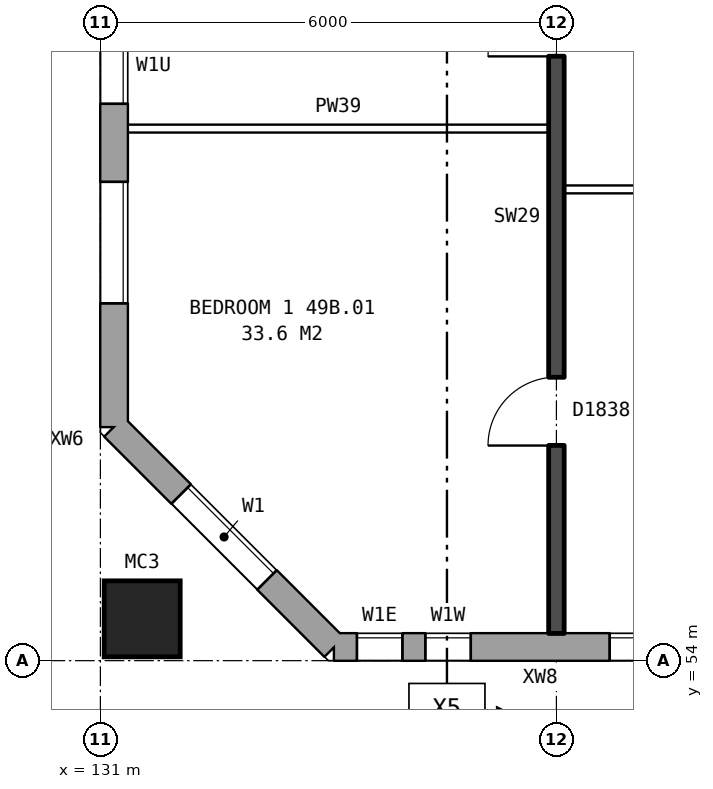
"""IFC4 building model, lengths in metres.
Left out: names, types, materials, properties, quantities, classifications, styles, units other than length and angle.
Written with IfcOpenShell. Run it as: python <this file> out.ifc"""

import sys

from ifc_helpers import new_model, si_unit, direction, frame, frame_2d, origin, origin_2d, place, context, subcontext, project, spatial, rectangle, hollow_rectangle, extrude, element, fill, save


model = new_model("IFC4")
c1 = context("Model", 3, precision=1e-05, world=origin(), true_north=direction((0.0, 1.0)))
c2 = subcontext(c1, "Body", "Model", "MODEL_VIEW")
j1 = project(units=[si_unit("LENGTHUNIT", "METRE"), si_unit("PLANEANGLEUNIT", "RADIAN")], contexts=[c1])
p1 = place(None, origin())
s1 = spatial("IfcSite", under=j1, at=p1, CompositionType="ELEMENT")
p2 = place(p1, origin())
s2 = spatial("IfcBuilding", under=s1, at=p2, CompositionType="ELEMENT")
p3 = place(p2, frame((0.0, 0.0, 175.8)))
s3 = spatial("IfcBuildingStorey", under=s2, at=p3, CompositionType="ELEMENT", Elevation=175.8)
p4 = place(p3, frame((131.55, 54.55, 0.0), z_axis=(0.0, 0.0, 1.0), x_axis=(1.0, 0.0, 0.0)))
e1 = element("IfcColumn", 1, at=p4, inside=s3, PredefinedType="COLUMN", context=c2, shape_type="SweptSolid", body=[
    extrude(hollow_rectangle(XDim=1.0, YDim=1.0, WallThickness=0.055, at=origin_2d()), origin(), (0.0, 0.0, 1.0), 3.1),
])
p5 = place(p3, frame((131.18, 57.075, 0.0), z_axis=(0.0, 0.0, 1.0), x_axis=(0.707106781187, -0.707106781187, 0.0)))
e2 = element("IfcWall", 2, at=p5, inside=s3, PredefinedType="STANDARD", context=c2, shape_type="SweptSolid", body=[
    extrude(rectangle(XDim=4.094, YDim=0.36, at=frame_2d((2.047, 0.0))), origin(), (0.0, 0.0, 1.0), 2.85),
])
p6 = place(p5, frame((1.247, 0.0, 0.8)))
e3 = element("IfcOpeningElement", 3, at=p6, cuts=e2, PredefinedType="OPENING", context=c2, shape_type="SweptSolid", body=[
    extrude(rectangle(XDim=1.6, YDim=1.8, at=frame_2d((0.8, 0.9))), frame((0.0, 0.19, 0.0), z_axis=(0.0, -1.0, 0.0), x_axis=(1.0, 0.0, 0.0)), (0.0, 0.0, 1.0), 0.38),
])
p7 = place(p3, frame((134.075, 54.18, 0.0), z_axis=(0.0, 0.0, 1.0), x_axis=(1.0, 0.0, 0.0)))
e4 = element("IfcWall", 4, at=p7, inside=s3, PredefinedType="STANDARD", context=c2, shape_type="SweptSolid", body=[
    extrude(rectangle(XDim=33.101, YDim=0.36, at=frame_2d((16.55, 0.0))), origin(), (0.0, 0.0, 1.0), 2.85),
])
p8 = place(p7, frame((0.3, 0.0, 0.8)))
e5 = element("IfcOpeningElement", 5, at=p8, cuts=e4, PredefinedType="OPENING", context=c2, shape_type="SweptSolid", body=[
    extrude(rectangle(XDim=0.6, YDim=1.8, at=frame_2d((0.3, 0.9))), frame((0.0, 0.19, 0.0), z_axis=(0.0, -1.0, 0.0), x_axis=(1.0, 0.0, 0.0)), (0.0, 0.0, 1.0), 0.38),
])
p9 = place(p7, frame((3.625, 0.0, 0.8)))
e6 = element("IfcOpeningElement", 6, at=p9, cuts=e4, PredefinedType="OPENING", context=c2, shape_type="SweptSolid", body=[
    extrude(rectangle(XDim=1.6, YDim=1.8, at=frame_2d((0.8, 0.9))), frame((0.0, 0.19, 0.0), z_axis=(0.0, -1.0, 0.0), x_axis=(1.0, 0.0, 0.0)), (0.0, 0.0, 1.0), 0.38),
])
p10 = place(p7, frame((6.625, 0.0, 0.8)))
e7 = element("IfcOpeningElement", 7, at=p10, cuts=e4, PredefinedType="OPENING", context=c2, shape_type="SweptSolid", body=[
    extrude(rectangle(XDim=1.6, YDim=1.8, at=frame_2d((0.8, 0.9))), frame((0.0, 0.19, 0.0), z_axis=(0.0, -1.0, 0.0), x_axis=(1.0, 0.0, 0.0)), (0.0, 0.0, 1.0), 0.38),
])
p11 = place(p7, frame((9.625, 0.0, 0.8)))
e8 = element("IfcOpeningElement", 8, at=p11, cuts=e4, PredefinedType="OPENING", context=c2, shape_type="SweptSolid", body=[
    extrude(rectangle(XDim=1.6, YDim=1.8, at=frame_2d((0.8, 0.9))), frame((0.0, 0.19, 0.0), z_axis=(0.0, -1.0, 0.0), x_axis=(1.0, 0.0, 0.0)), (0.0, 0.0, 1.0), 0.38),
])
p12 = place(p7, frame((12.625, 0.0, 0.8)))
e9 = element("IfcOpeningElement", 9, at=p12, cuts=e4, PredefinedType="OPENING", context=c2, shape_type="SweptSolid", body=[
    extrude(rectangle(XDim=1.6, YDim=1.8, at=frame_2d((0.8, 0.9))), frame((0.0, 0.19, 0.0), z_axis=(0.0, -1.0, 0.0), x_axis=(1.0, 0.0, 0.0)), (0.0, 0.0, 1.0), 0.38),
])
p13 = place(p7, frame((15.625, 0.0, 0.8)))
e10 = element("IfcOpeningElement", 10, at=p13, cuts=e4, PredefinedType="OPENING", context=c2, shape_type="SweptSolid", body=[
    extrude(rectangle(XDim=1.6, YDim=1.8, at=frame_2d((0.8, 0.9))), frame((0.0, 0.19, 0.0), z_axis=(0.0, -1.0, 0.0), x_axis=(1.0, 0.0, 0.0)), (0.0, 0.0, 1.0), 0.38),
])
p14 = place(p7, frame((18.625, 0.0, 0.8)))
e11 = element("IfcOpeningElement", 11, at=p14, cuts=e4, PredefinedType="OPENING", context=c2, shape_type="SweptSolid", body=[
    extrude(rectangle(XDim=1.6, YDim=1.8, at=frame_2d((0.8, 0.9))), frame((0.0, 0.19, 0.0), z_axis=(0.0, -1.0, 0.0), x_axis=(1.0, 0.0, 0.0)), (0.0, 0.0, 1.0), 0.38),
])
p15 = place(p7, frame((21.625, 0.0, 0.8)))
e12 = element("IfcOpeningElement", 12, at=p15, cuts=e4, PredefinedType="OPENING", context=c2, shape_type="SweptSolid", body=[
    extrude(rectangle(XDim=1.6, YDim=1.8, at=frame_2d((0.8, 0.9))), frame((0.0, 0.19, 0.0), z_axis=(0.0, -1.0, 0.0), x_axis=(1.0, 0.0, 0.0)), (0.0, 0.0, 1.0), 0.38),
])
p16 = place(p7, frame((24.625, 0.0, 0.8)))
e13 = element("IfcOpeningElement", 13, at=p16, cuts=e4, PredefinedType="OPENING", context=c2, shape_type="SweptSolid", body=[
    extrude(rectangle(XDim=1.6, YDim=1.8, at=frame_2d((0.8, 0.9))), frame((0.0, 0.19, 0.0), z_axis=(0.0, -1.0, 0.0), x_axis=(1.0, 0.0, 0.0)), (0.0, 0.0, 1.0), 0.38),
])
p17 = place(p7, frame((27.625, 0.0, 0.8)))
e14 = element("IfcOpeningElement", 14, at=p17, cuts=e4, PredefinedType="OPENING", context=c2, shape_type="SweptSolid", body=[
    extrude(rectangle(XDim=1.6, YDim=1.8, at=frame_2d((0.8, 0.9))), frame((0.0, 0.19, 0.0), z_axis=(0.0, -1.0, 0.0), x_axis=(1.0, 0.0, 0.0)), (0.0, 0.0, 1.0), 0.38),
])
p18 = place(p7, frame((29.525, 0.0, 0.8)))
e15 = element("IfcOpeningElement", 15, at=p18, cuts=e4, PredefinedType="OPENING", context=c2, shape_type="SweptSolid", body=[
    extrude(rectangle(XDim=0.6, YDim=0.9, at=frame_2d((0.3, 0.45))), frame((0.0, 0.19, 0.0), z_axis=(0.0, -1.0, 0.0), x_axis=(1.0, 0.0, 0.0)), (0.0, 0.0, 1.0), 0.38),
])
p19 = place(p7, frame((1.2, 0.0, 1.7)))
e16 = element("IfcOpeningElement", 16, at=p19, cuts=e4, PredefinedType="OPENING", context=c2, shape_type="SweptSolid", body=[
    extrude(rectangle(XDim=0.6, YDim=0.9, at=frame_2d((0.3, 0.45))), frame((0.0, 0.19, 0.0), z_axis=(0.0, -1.0, 0.0), x_axis=(1.0, 0.0, 0.0)), (0.0, 0.0, 1.0), 0.38),
])
p20 = place(p7, frame((31.575, 0.0, 1.4)))
e17 = element("IfcOpeningElement", 17, at=p20, cuts=e4, PredefinedType="OPENING", context=c2, shape_type="SweptSolid", body=[
    extrude(rectangle(XDim=1.2, YDim=1.2, at=frame_2d((0.6, 0.6))), frame((0.0, 0.19, 0.0), z_axis=(0.0, -1.0, 0.0), x_axis=(1.0, 0.0, 0.0)), (0.0, 0.0, 1.0), 0.38),
])
p21 = place(p3, frame((131.18, 82.925, 0.0), z_axis=(0.0, 0.0, 1.0), x_axis=(0.0, -1.0, 0.0)))
e18 = element("IfcWall", 18, at=p21, inside=s3, PredefinedType="STANDARD", context=c2, shape_type="SweptSolid", body=[
    extrude(rectangle(XDim=25.851, YDim=0.36, at=frame_2d((12.925, 0.0))), origin(), (0.0, 0.0, 1.0), 2.85),
])
p22 = place(p21, frame((1.625, 0.0, 0.8)))
e19 = element("IfcOpeningElement", 19, at=p22, cuts=e18, PredefinedType="OPENING", context=c2, shape_type="SweptSolid", body=[
    extrude(rectangle(XDim=1.6, YDim=1.8, at=frame_2d((0.8, 0.9))), frame((0.0, 0.19, 0.0), z_axis=(0.0, -1.0, 0.0), x_axis=(1.0, 0.0, 0.0)), (0.0, 0.0, 1.0), 0.38),
])
p23 = place(p21, frame((3.525, 0.0, 1.1)))
e20 = element("IfcOpeningElement", 20, at=p23, cuts=e18, PredefinedType="OPENING", context=c2, shape_type="SweptSolid", body=[
    extrude(rectangle(XDim=0.8, YDim=1.5, at=frame_2d((0.4, 0.75))), frame((0.0, 0.19, 0.0), z_axis=(0.0, -1.0, 0.0), x_axis=(1.0, 0.0, 0.0)), (0.0, 0.0, 1.0), 0.38),
])
p24 = place(p21, frame((19.45, 0.0, 0.35)))
e21 = element("IfcOpeningElement", 21, at=p24, cuts=e18, PredefinedType="OPENING", context=c2, shape_type="SweptSolid", body=[
    extrude(rectangle(XDim=0.8, YDim=0.9, at=frame_2d((0.4, 0.45))), frame((0.0, 0.19, 0.0), z_axis=(0.0, -1.0, 0.0), x_axis=(1.0, 0.0, 0.0)), (0.0, 0.0, 1.0), 0.38),
])
p25 = place(p21, frame((22.625, 0.0, 0.8)))
e22 = element("IfcOpeningElement", 22, at=p25, cuts=e18, PredefinedType="OPENING", context=c2, shape_type="SweptSolid", body=[
    extrude(rectangle(XDim=1.6, YDim=1.8, at=frame_2d((0.8, 0.9))), frame((0.0, 0.19, 0.0), z_axis=(0.0, -1.0, 0.0), x_axis=(1.0, 0.0, 0.0)), (0.0, 0.0, 1.0), 0.38),
])
p26 = place(p21, frame((4.625, 0.0, 1.7)))
e23 = element("IfcOpeningElement", 23, at=p26, cuts=e18, PredefinedType="OPENING", context=c2, shape_type="SweptSolid", body=[
    extrude(rectangle(XDim=0.6, YDim=0.9, at=frame_2d((0.3, 0.45))), frame((0.0, 0.19, 0.0), z_axis=(0.0, -1.0, 0.0), x_axis=(1.0, 0.0, 0.0)), (0.0, 0.0, 1.0), 0.38),
])
p27 = place(p21, frame((20.6, 0.0, 1.65)))
e24 = element("IfcOpeningElement", 24, at=p27, cuts=e18, PredefinedType="OPENING", context=c2, shape_type="SweptSolid", body=[
    extrude(rectangle(XDim=1.0, YDim=0.9, at=frame_2d((0.5, 0.45))), frame((0.0, 0.19, 0.0), z_axis=(0.0, -1.0, 0.0), x_axis=(1.0, 0.0, 0.0)), (0.0, 0.0, 1.0), 0.38),
])
p28 = place(p3, frame((137.1, 60.2, 0.0), z_axis=(0.0, 0.0, 1.0), x_axis=(1.0, 0.0, 0.0)))
e25 = element("IfcWall", 25, at=p28, inside=s3, PredefinedType="PARTITIONING", context=c2, shape_type="SweptSolid", body=[
    extrude(rectangle(XDim=5.8, YDim=0.1, at=frame_2d((2.9, 0.0))), origin(), (0.0, 0.0, 1.0), 2.85),
])
p29 = place(p28, frame((1.3, 0.0, 0.0)))
e26 = element("IfcOpeningElement", 26, at=p29, cuts=e25, PredefinedType="OPENING", context=c2, shape_type="SweptSolid", body=[
    extrude(rectangle(XDim=0.9, YDim=2.1, at=frame_2d((0.45, 1.05))), frame((0.0, 0.06, 0.0), z_axis=(0.0, -1.0, 0.0), x_axis=(1.0, 0.0, 0.0)), (0.0, 0.0, 1.0), 0.12),
])
p30 = place(p28, frame((4.2, 0.0, 0.0)))
e27 = element("IfcOpeningElement", 27, at=p30, cuts=e25, PredefinedType="OPENING", context=c2, shape_type="SweptSolid", body=[
    extrude(rectangle(XDim=0.9, YDim=2.1, at=frame_2d((0.45, 1.05))), frame((0.0, 0.06, 0.0), z_axis=(0.0, -1.0, 0.0), x_axis=(1.0, 0.0, 0.0)), (0.0, 0.0, 1.0), 0.12),
])
p31 = place(p3, frame((131.36, 61.0, 0.0), z_axis=(0.0, 0.0, 1.0), x_axis=(1.0, 0.0, 0.0)))
e28 = element("IfcWall", 28, at=p31, inside=s3, PredefinedType="PARTITIONING", context=c2, shape_type="SweptSolid", body=[
    extrude(rectangle(XDim=5.54, YDim=0.1, at=frame_2d((2.77, 0.0))), origin(), (0.0, 0.0, 1.0), 2.85),
])
p32 = place(p3, frame((137.0, 54.36, 0.0), z_axis=(0.0, 0.0, 1.0), x_axis=(0.0, 1.0, 0.0)))
e29 = element("IfcWall", 29, at=p32, inside=s3, PredefinedType="SOLIDWALL", context=c2, shape_type="SweptSolid", body=[
    extrude(rectangle(XDim=9.44, YDim=0.2, at=frame_2d((4.72, 0.0))), origin(), (0.0, 0.0, 1.0), 2.85),
])
p33 = place(p32, frame((2.47, 0.0, 0.0)))
e30 = element("IfcOpeningElement", 30, at=p33, cuts=e29, PredefinedType="OPENING", context=c2, shape_type="SweptSolid", body=[
    extrude(rectangle(XDim=0.9, YDim=2.1, at=frame_2d((0.45, 1.05))), frame((0.0, 0.11, 0.0), z_axis=(0.0, -1.0, 0.0), x_axis=(1.0, 0.0, 0.0)), (0.0, 0.0, 1.0), 0.22),
])
p34 = place(p32, frame((7.59, 0.0, 0.0)))
e31 = element("IfcOpeningElement", 31, at=p34, cuts=e29, PredefinedType="OPENING", context=c2, shape_type="SweptSolid", body=[
    extrude(rectangle(XDim=0.9, YDim=2.1, at=frame_2d((0.45, 1.05))), frame((0.0, 0.11, 0.0), z_axis=(0.0, -1.0, 0.0), x_axis=(1.0, 0.0, 0.0)), (0.0, 0.0, 1.0), 0.22),
])
p35 = place(p6, origin())
e32 = element("IfcWindow", 32, at=p35, inside=s3, PartitioningType="SINGLE_PANEL", PredefinedType="WINDOW", context=c2, shape_type="SweptSolid", body=[
    extrude(rectangle(XDim=1.6, YDim=1.8, at=frame_2d((0.8, 0.9))), frame((0.0, 0.15, 0.0), z_axis=(0.0, -1.0, 0.0), x_axis=(1.0, 0.0, 0.0)), (0.0, 0.0, 1.0), 0.06),
])
fill(e3, e32)
p36 = place(p8, origin())
e33 = element("IfcWindow", 33, at=p36, inside=s3, PartitioningType="SINGLE_PANEL", PredefinedType="WINDOW", context=c2, shape_type="SweptSolid", body=[
    extrude(rectangle(XDim=0.6, YDim=1.8, at=frame_2d((0.3, 0.9))), frame((0.0, 0.15, 0.0), z_axis=(0.0, -1.0, 0.0), x_axis=(1.0, 0.0, 0.0)), (0.0, 0.0, 1.0), 0.06),
])
fill(e5, e33)
p37 = place(p9, origin())
e34 = element("IfcWindow", 34, at=p37, inside=s3, PartitioningType="SINGLE_PANEL", PredefinedType="WINDOW", context=c2, shape_type="SweptSolid", body=[
    extrude(rectangle(XDim=1.6, YDim=1.8, at=frame_2d((0.8, 0.9))), frame((0.0, 0.15, 0.0), z_axis=(0.0, -1.0, 0.0), x_axis=(1.0, 0.0, 0.0)), (0.0, 0.0, 1.0), 0.06),
])
fill(e6, e34)
p38 = place(p25, origin())
e35 = element("IfcWindow", 35, at=p38, inside=s3, PartitioningType="SINGLE_PANEL", PredefinedType="WINDOW", context=c2, shape_type="SweptSolid", body=[
    extrude(rectangle(XDim=1.6, YDim=1.8, at=frame_2d((0.8, 0.9))), frame((0.0, 0.15, 0.0), z_axis=(0.0, -1.0, 0.0), x_axis=(1.0, 0.0, 0.0)), (0.0, 0.0, 1.0), 0.06),
])
fill(e22, e35)
p39 = place(p33, origin())
e36 = element("IfcDoor", 36, at=p39, inside=s3, OperationType="SINGLE_SWING_LEFT", PredefinedType="DOOR", context=c2, shape_type="SweptSolid", body=[
    extrude(rectangle(XDim=0.9, YDim=2.1, at=frame_2d((0.45, 1.05))), frame((0.0, 0.025, 0.0), z_axis=(0.0, -1.0, 0.0), x_axis=(1.0, 0.0, 0.0)), (0.0, 0.0, 1.0), 0.05),
])
fill(e30, e36)
p40 = place(p34, origin())
e37 = element("IfcDoor", 37, at=p40, inside=s3, OperationType="SINGLE_SWING_LEFT", PredefinedType="DOOR", context=c2, shape_type="SweptSolid", body=[
    extrude(rectangle(XDim=0.9, YDim=2.1, at=frame_2d((0.45, 1.05))), frame((0.0, 0.025, 0.0), z_axis=(0.0, -1.0, 0.0), x_axis=(1.0, 0.0, 0.0)), (0.0, 0.0, 1.0), 0.05),
])
fill(e31, e37)
p41 = place(p19, origin())
e38 = element("IfcWindow", 38, at=p41, inside=s3, PartitioningType="SINGLE_PANEL", PredefinedType="WINDOW", context=c2, shape_type="SweptSolid", body=[
    extrude(rectangle(XDim=0.6, YDim=0.9, at=frame_2d((0.3, 0.45))), frame((0.0, 0.15, 0.0), z_axis=(0.0, -1.0, 0.0), x_axis=(1.0, 0.0, 0.0)), (0.0, 0.0, 1.0), 0.06),
])
fill(e16, e38)
p42 = place(p27, origin())
e39 = element("IfcWindow", 39, at=p42, inside=s3, PartitioningType="SINGLE_PANEL", PredefinedType="WINDOW", context=c2, shape_type="SweptSolid", body=[
    extrude(rectangle(XDim=1.0, YDim=0.9, at=frame_2d((0.5, 0.45))), frame((0.0, 0.15, 0.0), z_axis=(0.0, -1.0, 0.0), x_axis=(1.0, 0.0, 0.0)), (0.0, 0.0, 1.0), 0.06),
])
fill(e24, e39)
save(model, sys.argv[1])
